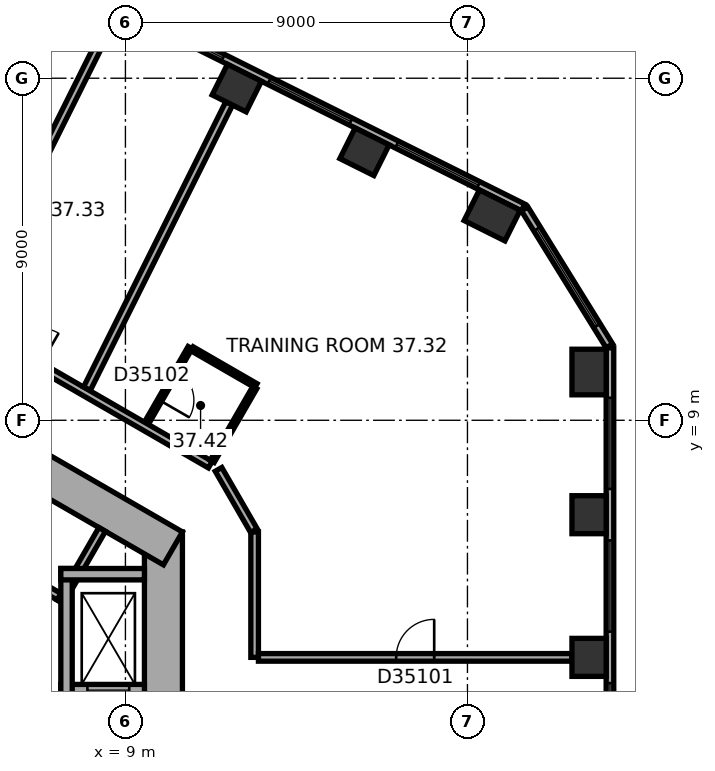
"""IFC4 building model, lengths in metres.
Left out: names, types, materials, properties, quantities, classifications, styles, units other than length and angle.
Written with IfcOpenShell. Run it as: python <this file> out.ifc"""

import sys

from ifc_helpers import new_model, si_unit, direction, frame, frame_2d, origin, origin_2d, place, context, subcontext, project, spatial, rectangle, extrude, element, fill, save


model = new_model("IFC4")
c1 = context("Model", 3, precision=1e-05, world=origin(), true_north=direction((0.0, 1.0)))
c2 = subcontext(c1, "Body", "Model", "MODEL_VIEW")
j1 = project(units=[si_unit("LENGTHUNIT", "METRE"), si_unit("PLANEANGLEUNIT", "RADIAN")], contexts=[c1])
p1 = place(None, origin())
s1 = spatial("IfcSite", under=j1, at=p1, CompositionType="ELEMENT")
p2 = place(p1, origin())
s2 = spatial("IfcBuilding", under=s1, at=p2, CompositionType="ELEMENT")
p3 = place(p2, frame((0.0, 0.0, 154.0)))
s3 = spatial("IfcBuildingStorey", under=s2, at=p3, CompositionType="ELEMENT", Elevation=154.0)
for number, where, z_axis, x_axis in (
    (1, (21.2, 2.761, 0.0), (0.0, 0.0, 1.0), (0.0, 1.0, 0.0)),
    (2, (21.2, 6.515, 0.0), (0.0, 0.0, 1.0), (0.0, 1.0, 0.0)),
):
    element("IfcColumn", number, at=place(p3, frame(where, z_axis=z_axis, x_axis=x_axis)), inside=s3, PredefinedType="COLUMN", context=c2, shape_type="SweptSolid", body=[
        extrude(rectangle(XDim=1.0, YDim=0.9, at=origin_2d()), origin(), (0.0, 0.0, 1.0), 3.7),
    ])
for number, where, z_axis, x_axis in (
    (3, (21.2, 10.27, 0.0), (0.0, 0.0, 1.0), (0.0, 1.0, 0.0)),
    (4, (18.65, 14.39, 0.0), (0.0, 0.0, 1.0), (-0.895, 0.446, 0.0)),
):
    element("IfcColumn", number, at=place(p3, frame(where, z_axis=z_axis, x_axis=x_axis)), inside=s3, PredefinedType="COLUMN", context=c2, shape_type="SweptSolid", body=[
        extrude(rectangle(XDim=1.2, YDim=0.9, at=origin_2d()), origin(), (0.0, 0.0, 1.0), 3.7),
    ])
for number, where, z_axis, x_axis in (
    (5, (15.29, 16.065, 0.0), (0.0, 0.0, 1.0), (-0.895, 0.446, 0.0)),
    (6, (11.931, 17.74, 0.0), (0.0, 0.0, 1.0), (-0.895, 0.446, 0.0)),
):
    element("IfcColumn", number, at=place(p3, frame(where, z_axis=z_axis, x_axis=x_axis)), inside=s3, PredefinedType="COLUMN", context=c2, shape_type="SweptSolid", body=[
        extrude(rectangle(XDim=1.0, YDim=0.9, at=origin_2d()), origin(), (0.0, 0.0, 1.0), 3.7),
    ])
p4 = place(p3, frame((10.0, -6.062, 0.0), z_axis=(0.0, 0.0, 1.0), x_axis=(0.0, 1.0, 0.0)))
e7 = element("IfcWall", 7, at=p4, inside=s3, PredefinedType="SHEAR", context=c2, shape_type="SweptSolid", body=[
    extrude(rectangle(XDim=12.125, YDim=1.0, at=frame_2d((6.062, 0.0))), origin(), (0.0, 0.0, 1.0), 3.7),
])
p5 = place(p4, frame((6.262, 0.0, 0.0)))
e8 = element("IfcOpeningElement", 8, at=p5, cuts=e7, PredefinedType="OPENING", context=c2, shape_type="SweptSolid", body=[
    extrude(rectangle(XDim=1.5, YDim=2.1, at=frame_2d((0.75, 1.05))), frame((0.0, 0.51, 0.0), z_axis=(0.0, -1.0, 0.0), x_axis=(1.0, 0.0, 0.0)), (0.0, 0.0, 1.0), 1.02),
])
p6 = place(p4, frame((3.112, 0.0, 0.0)))
e9 = element("IfcOpeningElement", 9, at=p6, cuts=e7, PredefinedType="OPENING", context=c2, shape_type="SweptSolid", body=[
    extrude(rectangle(XDim=0.9, YDim=2.1, at=frame_2d((0.45, 1.05))), frame((0.0, 0.51, 0.0), z_axis=(0.0, -1.0, 0.0), x_axis=(1.0, 0.0, 0.0)), (0.0, 0.0, 1.0), 1.02),
])
p7 = place(p3, frame((10.25, 5.629, 0.0), z_axis=(0.0, 0.0, 1.0), x_axis=(-0.866022616891, 0.50000482701, 0.0)))
e10 = element("IfcWall", 10, at=p7, inside=s3, PredefinedType="SHEAR", context=c2, shape_type="SweptSolid", body=[
    extrude(rectangle(XDim=12.125, YDim=1.0, at=frame_2d((6.062, 0.0))), origin(), (0.0, 0.0, 1.0), 3.7),
])
p8 = place(p7, frame((4.012, 0.0, 0.0)))
e11 = element("IfcOpeningElement", 11, at=p8, cuts=e10, PredefinedType="OPENING", context=c2, shape_type="SweptSolid", body=[
    extrude(rectangle(XDim=0.9, YDim=2.1, at=frame_2d((0.45, 1.05))), frame((0.0, 0.51, 0.0), z_axis=(0.0, -1.0, 0.0), x_axis=(1.0, 0.0, 0.0)), (0.0, 0.0, 1.0), 1.02),
])
p9 = place(p7, frame((7.912, 0.0, 0.0)))
e12 = element("IfcOpeningElement", 12, at=p9, cuts=e10, PredefinedType="OPENING", context=c2, shape_type="SweptSolid", body=[
    extrude(rectangle(XDim=0.9, YDim=2.1, at=frame_2d((0.45, 1.05))), frame((0.0, 0.51, 0.0), z_axis=(0.0, -1.0, 0.0), x_axis=(1.0, 0.0, 0.0)), (0.0, 0.0, 1.0), 1.02),
])
p10 = place(p3, frame((21.75, -9.138, 0.0), z_axis=(0.0, 0.0, 1.0), x_axis=(0.0, 1.0, 0.0)))
e13 = element("IfcWall", 13, at=p10, inside=s3, PredefinedType="STANDARD", context=c2, shape_type="SweptSolid", body=[
    extrude(rectangle(XDim=20.044, YDim=0.2, at=frame_2d((10.022, 0.0))), origin(), (0.0, 0.0, 1.0), 3.7),
])
p11 = place(p10, frame((1.314, 0.0, 0.9)))
e14 = element("IfcOpeningElement", 14, at=p11, cuts=e13, PredefinedType="OPENING", context=c2, shape_type="SweptSolid", body=[
    extrude(rectangle(XDim=2.4, YDim=2.0, at=frame_2d((1.2, 1.0))), frame((0.0, 0.11, 0.0), z_axis=(0.0, -1.0, 0.0), x_axis=(1.0, 0.0, 0.0)), (0.0, 0.0, 1.0), 0.22),
])
p12 = place(p10, frame((5.069, 0.0, 0.9)))
e15 = element("IfcOpeningElement", 15, at=p12, cuts=e13, PredefinedType="OPENING", context=c2, shape_type="SweptSolid", body=[
    extrude(rectangle(XDim=2.4, YDim=2.0, at=frame_2d((1.2, 1.0))), frame((0.0, 0.11, 0.0), z_axis=(0.0, -1.0, 0.0), x_axis=(1.0, 0.0, 0.0)), (0.0, 0.0, 1.0), 0.22),
])
p13 = place(p10, frame((8.823, 0.0, 0.9)))
e16 = element("IfcOpeningElement", 16, at=p13, cuts=e13, PredefinedType="OPENING", context=c2, shape_type="SweptSolid", body=[
    extrude(rectangle(XDim=2.4, YDim=2.0, at=frame_2d((1.2, 1.0))), frame((0.0, 0.11, 0.0), z_axis=(0.0, -1.0, 0.0), x_axis=(1.0, 0.0, 0.0)), (0.0, 0.0, 1.0), 0.22),
])
p14 = place(p10, frame((12.577, 0.0, 0.9)))
e17 = element("IfcOpeningElement", 17, at=p14, cuts=e13, PredefinedType="OPENING", context=c2, shape_type="SweptSolid", body=[
    extrude(rectangle(XDim=2.4, YDim=2.0, at=frame_2d((1.2, 1.0))), frame((0.0, 0.11, 0.0), z_axis=(0.0, -1.0, 0.0), x_axis=(1.0, 0.0, 0.0)), (0.0, 0.0, 1.0), 0.22),
])
p15 = place(p10, frame((16.331, 0.0, 0.9)))
e18 = element("IfcOpeningElement", 18, at=p15, cuts=e13, PredefinedType="OPENING", context=c2, shape_type="SweptSolid", body=[
    extrude(rectangle(XDim=2.4, YDim=2.0, at=frame_2d((1.2, 1.0))), frame((0.0, 0.11, 0.0), z_axis=(0.0, -1.0, 0.0), x_axis=(1.0, 0.0, 0.0)), (0.0, 0.0, 1.0), 0.22),
])
p16 = place(p3, frame((21.735, 10.958, 0.0), z_axis=(0.0, 0.0, 1.0), x_axis=(-0.526213807775, 0.850352296702, 0.0)))
e19 = element("IfcWall", 19, at=p16, inside=s3, PredefinedType="STANDARD", context=c2, shape_type="SweptSolid", body=[
    extrude(rectangle(XDim=4.238, YDim=0.2, at=frame_2d((2.119, 0.0))), origin(), (0.0, 0.0, 1.0), 3.7),
])
p17 = place(p16, frame((0.619, 0.0, 0.9)))
e20 = element("IfcOpeningElement", 20, at=p17, cuts=e19, PredefinedType="OPENING", context=c2, shape_type="SweptSolid", body=[
    extrude(rectangle(XDim=3.0, YDim=2.0, at=frame_2d((1.5, 1.0))), frame((0.0, 0.11, 0.0), z_axis=(0.0, -1.0, 0.0), x_axis=(1.0, 0.0, 0.0)), (0.0, 0.0, 1.0), 0.22),
])
p18 = place(p3, frame((19.464, 14.599, 0.0), z_axis=(0.0, 0.0, 1.0), x_axis=(-0.894935755043, 0.446195018289, 0.0)))
e21 = element("IfcWall", 21, at=p18, inside=s3, PredefinedType="STANDARD", context=c2, shape_type="SweptSolid", body=[
    extrude(rectangle(XDim=20.044, YDim=0.2, at=frame_2d((10.022, 0.0))), origin(), (0.0, 0.0, 1.0), 3.7),
])
p19 = place(p18, frame((1.313, 0.0, 0.9)))
e22 = element("IfcOpeningElement", 22, at=p19, cuts=e21, PredefinedType="OPENING", context=c2, shape_type="SweptSolid", body=[
    extrude(rectangle(XDim=2.4, YDim=2.0, at=frame_2d((1.2, 1.0))), frame((0.0, 0.11, 0.0), z_axis=(0.0, -1.0, 0.0), x_axis=(1.0, 0.0, 0.0)), (0.0, 0.0, 1.0), 0.22),
])
p20 = place(p18, frame((5.067, 0.0, 0.9)))
e23 = element("IfcOpeningElement", 23, at=p20, cuts=e21, PredefinedType="OPENING", context=c2, shape_type="SweptSolid", body=[
    extrude(rectangle(XDim=2.4, YDim=2.0, at=frame_2d((1.2, 1.0))), frame((0.0, 0.11, 0.0), z_axis=(0.0, -1.0, 0.0), x_axis=(1.0, 0.0, 0.0)), (0.0, 0.0, 1.0), 0.22),
])
p21 = place(p18, frame((8.821, 0.0, 0.9)))
e24 = element("IfcOpeningElement", 24, at=p21, cuts=e21, PredefinedType="OPENING", context=c2, shape_type="SweptSolid", body=[
    extrude(rectangle(XDim=2.4, YDim=2.0, at=frame_2d((1.2, 1.0))), frame((0.0, 0.11, 0.0), z_axis=(0.0, -1.0, 0.0), x_axis=(1.0, 0.0, 0.0)), (0.0, 0.0, 1.0), 0.22),
])
p22 = place(p18, frame((12.575, 0.0, 0.9)))
e25 = element("IfcOpeningElement", 25, at=p22, cuts=e21, PredefinedType="OPENING", context=c2, shape_type="SweptSolid", body=[
    extrude(rectangle(XDim=2.4, YDim=2.0, at=frame_2d((1.2, 1.0))), frame((0.0, 0.11, 0.0), z_axis=(0.0, -1.0, 0.0), x_axis=(1.0, 0.0, 0.0)), (0.0, 0.0, 1.0), 0.22),
])
p23 = place(p18, frame((16.329, 0.0, 0.9)))
e26 = element("IfcOpeningElement", 26, at=p23, cuts=e21, PredefinedType="OPENING", context=c2, shape_type="SweptSolid", body=[
    extrude(rectangle(XDim=2.4, YDim=2.0, at=frame_2d((1.2, 1.0))), frame((0.0, 0.11, 0.0), z_axis=(0.0, -1.0, 0.0), x_axis=(1.0, 0.0, 0.0)), (0.0, 0.0, 1.0), 0.22),
])
p24 = place(p3, frame((7.424, 4.259, 0.0), z_axis=(0.0, 0.0, 1.0), x_axis=(-0.866026010844, 0.49999894854, 0.0)))
e27 = element("IfcWall", 27, at=p24, inside=s3, PredefinedType="PARTITIONING", context=c2, shape_type="SweptSolid", body=[
    extrude(rectangle(XDim=8.0, YDim=0.2, at=frame_2d((4.0, 0.0))), origin(), (0.0, 0.0, 1.0), 3.42),
])
p25 = place(p3, frame((7.287, 4.222, 0.0), z_axis=(0.0, 0.0, 1.0), x_axis=(0.499946605688, 0.86605622881, 0.0)))
e28 = element("IfcWall", 28, at=p25, inside=s3, PredefinedType="PARTITIONING", context=c2, shape_type="SweptSolid", body=[
    extrude(rectangle(XDim=2.2, YDim=0.2, at=frame_2d((1.1, 0.0))), origin(), (0.0, 0.0, 1.0), 3.42),
])
p26 = place(p3, frame((7.3, 1.9, 0.0), z_axis=(0.0, 0.0, 1.0), x_axis=(1.0, 0.0, 0.0)))
e29 = element("IfcWall", 29, at=p26, inside=s3, PredefinedType="SHEAR", context=c2, shape_type="SweptSolid", body=[
    extrude(rectangle(XDim=2.2, YDim=0.3, at=frame_2d((1.1, 0.0))), origin(), (0.0, 0.0, 1.0), 3.42),
])
p27 = place(p26, frame((0.7, 0.0, 0.0)))
e30 = element("IfcOpeningElement", 30, at=p27, cuts=e29, PredefinedType="OPENING", context=c2, shape_type="SweptSolid", body=[
    extrude(rectangle(XDim=1.1, YDim=2.1, at=frame_2d((0.55, 1.05))), frame((0.0, 0.16, 0.0), z_axis=(0.0, -1.0, 0.0), x_axis=(1.0, 0.0, 0.0)), (0.0, 0.0, 1.0), 0.32),
])
p28 = place(p3, frame((7.45, 1.75, 0.0), z_axis=(0.0, 0.0, 1.0), x_axis=(0.0, 1.0, 0.0)))
e31 = element("IfcWall", 31, at=p28, inside=s3, PredefinedType="SHEAR", context=c2, shape_type="SweptSolid", body=[
    extrude(rectangle(XDim=3.35, YDim=0.3, at=frame_2d((1.675, 0.0))), origin(), (0.0, 0.0, 1.0), 3.42),
])
p29 = place(p3, frame((7.3, 4.95, 0.0), z_axis=(0.0, 0.0, 1.0), x_axis=(1.0, 0.0, 0.0)))
e32 = element("IfcWall", 32, at=p29, inside=s3, PredefinedType="SHEAR", context=c2, shape_type="SweptSolid", body=[
    extrude(rectangle(XDim=2.2, YDim=0.3, at=frame_2d((1.1, 0.0))), origin(), (0.0, 0.0, 1.0), 3.42),
])
p30 = place(p3, frame((8.37, 19.013, 0.0), z_axis=(0.0, 0.0, 1.0), x_axis=(-0.446183598632, -0.894941448538, 0.0)))
e33 = element("IfcWall", 33, at=p30, inside=s3, PredefinedType="PARTITIONING", context=c2, shape_type="SweptSolid", body=[
    extrude(rectangle(XDim=8.156, YDim=0.2, at=frame_2d((4.078, 0.0))), origin(), (0.0, 0.0, 1.0), 3.42),
])
p31 = place(p3, frame((9.552, 8.919, 0.0), z_axis=(0.0, 0.0, 1.0), x_axis=(0.499952165731, 0.866053019151, 0.0)))
e34 = element("IfcWall", 34, at=p31, inside=s3, PredefinedType="PARTITIONING", context=c2, shape_type="SweptSolid", body=[
    extrude(rectangle(XDim=2.3, YDim=0.12, at=frame_2d((1.15, 0.0))), origin(), (0.0, 0.0, 1.0), 3.42),
])
p32 = place(p31, frame((0.7, 0.0, 0.0)))
e35 = element("IfcOpeningElement", 35, at=p32, cuts=e34, PredefinedType="OPENING", context=c2, shape_type="SweptSolid", body=[
    extrude(rectangle(XDim=0.9, YDim=2.1, at=frame_2d((0.45, 1.05))), frame((0.0, 0.07, 0.0), z_axis=(0.0, -1.0, 0.0), x_axis=(1.0, 0.0, 0.0)), (0.0, 0.0, 1.0), 0.14),
])
p33 = place(p3, frame((10.753, 10.881, 0.0), z_axis=(0.0, 0.0, 1.0), x_axis=(0.866043088465, -0.499969367985, 0.0)))
e36 = element("IfcWall", 36, at=p33, inside=s3, PredefinedType="PARTITIONING", context=c2, shape_type="SweptSolid", body=[
    extrude(rectangle(XDim=1.94, YDim=0.12, at=frame_2d((0.97, 0.0))), origin(), (0.0, 0.0, 1.0), 3.42),
])
p34 = place(p3, frame((11.233, 7.833, 0.0), z_axis=(0.0, 0.0, 1.0), x_axis=(-0.866021713988, 0.50000639086, 0.0)))
e37 = element("IfcWall", 37, at=p34, inside=s3, PredefinedType="PARTITIONING", context=c2, shape_type="SweptSolid", body=[
    extrude(rectangle(XDim=11.834, YDim=0.2, at=frame_2d((5.917, 0.0))), origin(), (0.0, 0.0, 1.0), 3.42),
])
p35 = place(p34, frame((5.185, 0.0, 0.0)))
e38 = element("IfcOpeningElement", 38, at=p35, cuts=e37, PredefinedType="OPENING", context=c2, shape_type="SweptSolid", body=[
    extrude(rectangle(XDim=1.0, YDim=2.1, at=frame_2d((0.5, 1.05))), frame((0.0, 0.11, 0.0), z_axis=(0.0, -1.0, 0.0), x_axis=(1.0, 0.0, 0.0)), (0.0, 0.0, 1.0), 0.22),
])
p36 = place(p3, frame((11.73, 17.338, 0.0), z_axis=(0.0, 0.0, 1.0), x_axis=(-0.446165200553, -0.894950620881, 0.0)))
e39 = element("IfcWall", 39, at=p36, inside=s3, PredefinedType="PARTITIONING", context=c2, shape_type="SweptSolid", body=[
    extrude(rectangle(XDim=8.386, YDim=0.2, at=frame_2d((4.193, 0.0))), origin(), (0.0, 0.0, 1.0), 2.87),
])
p37 = place(p3, frame((12.38, 6.097, 0.0), z_axis=(0.0, 0.0, 1.0), x_axis=(-0.499964847546, 0.866045698112, 0.0)))
e40 = element("IfcWall", 40, at=p37, inside=s3, PredefinedType="PARTITIONING", context=c2, shape_type="SweptSolid", body=[
    extrude(rectangle(XDim=1.86, YDim=0.2, at=frame_2d((0.93, 0.0))), origin(), (0.0, 0.0, 1.0), 3.42),
])
p38 = place(p3, frame((12.4, 2.761, 0.0), z_axis=(0.0, 0.0, 1.0), x_axis=(0.0, 1.0, 0.0)))
e41 = element("IfcWall", 41, at=p38, inside=s3, PredefinedType="PARTITIONING", context=c2, shape_type="SweptSolid", body=[
    extrude(rectangle(XDim=3.301, YDim=0.2, at=frame_2d((1.65, 0.0))), origin(), (0.0, 0.0, 1.0), 3.42),
])
p39 = place(p3, frame((12.404, 9.859, 0.0), z_axis=(0.0, 0.0, 1.0), x_axis=(-0.500030632641, -0.866007717299, 0.0)))
e42 = element("IfcWall", 42, at=p39, inside=s3, PredefinedType="PARTITIONING", context=c2, shape_type="SweptSolid", body=[
    extrude(rectangle(XDim=2.24, YDim=0.12, at=frame_2d((1.12, 0.0))), origin(), (0.0, 0.0, 1.0), 3.42),
])
p40 = place(p3, frame((20.75, 2.761, 0.0), z_axis=(0.0, 0.0, 1.0), x_axis=(-1.0, 0.0, 0.0)))
e43 = element("IfcWall", 43, at=p40, inside=s3, PredefinedType="PARTITIONING", context=c2, shape_type="SweptSolid", body=[
    extrude(rectangle(XDim=8.25, YDim=0.2, at=frame_2d((4.125, 0.0))), origin(), (0.0, 0.0, 1.0), 3.42),
])
p41 = place(p40, frame((3.625, 0.0, 0.0)))
e44 = element("IfcOpeningElement", 44, at=p41, cuts=e43, PredefinedType="OPENING", context=c2, shape_type="SweptSolid", body=[
    extrude(rectangle(XDim=1.0, YDim=2.1, at=frame_2d((0.5, 1.05))), frame((0.0, 0.11, 0.0), z_axis=(0.0, -1.0, 0.0), x_axis=(1.0, 0.0, 0.0)), (0.0, 0.0, 1.0), 0.22),
])
p42 = place(p13, origin())
e45 = element("IfcWindow", 45, at=p42, inside=s3, PartitioningType="SINGLE_PANEL", PredefinedType="WINDOW", context=c2, shape_type="SweptSolid", body=[
    extrude(rectangle(XDim=2.4, YDim=2.0, at=frame_2d((1.2, 1.0))), frame((0.0, 0.03, 0.0), z_axis=(0.0, -1.0, 0.0), x_axis=(1.0, 0.0, 0.0)), (0.0, 0.0, 1.0), 0.06),
])
fill(e16, e45)
p43 = place(p14, origin())
e46 = element("IfcWindow", 46, at=p43, inside=s3, PartitioningType="SINGLE_PANEL", PredefinedType="WINDOW", context=c2, shape_type="SweptSolid", body=[
    extrude(rectangle(XDim=2.4, YDim=2.0, at=frame_2d((1.2, 1.0))), frame((0.0, 0.03, 0.0), z_axis=(0.0, -1.0, 0.0), x_axis=(1.0, 0.0, 0.0)), (0.0, 0.0, 1.0), 0.06),
])
fill(e17, e46)
p44 = place(p15, origin())
e47 = element("IfcWindow", 47, at=p44, inside=s3, PartitioningType="SINGLE_PANEL", PredefinedType="WINDOW", context=c2, shape_type="SweptSolid", body=[
    extrude(rectangle(XDim=2.4, YDim=2.0, at=frame_2d((1.2, 1.0))), frame((0.0, 0.03, 0.0), z_axis=(0.0, -1.0, 0.0), x_axis=(1.0, 0.0, 0.0)), (0.0, 0.0, 1.0), 0.06),
])
fill(e18, e47)
p45 = place(p17, origin())
e48 = element("IfcWindow", 48, at=p45, inside=s3, PartitioningType="SINGLE_PANEL", PredefinedType="WINDOW", context=c2, shape_type="SweptSolid", body=[
    extrude(rectangle(XDim=3.0, YDim=2.0, at=frame_2d((1.5, 1.0))), frame((0.0, 0.03, 0.0), z_axis=(0.0, -1.0, 0.0), x_axis=(1.0, 0.0, 0.0)), (0.0, 0.0, 1.0), 0.06),
])
fill(e20, e48)
p46 = place(p19, origin())
e49 = element("IfcWindow", 49, at=p46, inside=s3, PartitioningType="SINGLE_PANEL", PredefinedType="WINDOW", context=c2, shape_type="SweptSolid", body=[
    extrude(rectangle(XDim=2.4, YDim=2.0, at=frame_2d((1.2, 1.0))), frame((0.0, 0.03, 0.0), z_axis=(0.0, -1.0, 0.0), x_axis=(1.0, 0.0, 0.0)), (0.0, 0.0, 1.0), 0.06),
])
fill(e22, e49)
p47 = place(p20, origin())
e50 = element("IfcWindow", 50, at=p47, inside=s3, PartitioningType="SINGLE_PANEL", PredefinedType="WINDOW", context=c2, shape_type="SweptSolid", body=[
    extrude(rectangle(XDim=2.4, YDim=2.0, at=frame_2d((1.2, 1.0))), frame((0.0, 0.03, 0.0), z_axis=(0.0, -1.0, 0.0), x_axis=(1.0, 0.0, 0.0)), (0.0, 0.0, 1.0), 0.06),
])
fill(e23, e50)
p48 = place(p21, origin())
e51 = element("IfcWindow", 51, at=p48, inside=s3, PartitioningType="SINGLE_PANEL", PredefinedType="WINDOW", context=c2, shape_type="SweptSolid", body=[
    extrude(rectangle(XDim=2.4, YDim=2.0, at=frame_2d((1.2, 1.0))), frame((0.0, 0.03, 0.0), z_axis=(0.0, -1.0, 0.0), x_axis=(1.0, 0.0, 0.0)), (0.0, 0.0, 1.0), 0.06),
])
fill(e24, e51)
p49 = place(p27, origin())
e52 = element("IfcDoor", 52, at=p49, inside=s3, OperationType="DOUBLE_DOOR_SLIDING", PredefinedType="DOOR", context=c2, shape_type="SweptSolid", body=[
    extrude(rectangle(XDim=1.1, YDim=2.1, at=frame_2d((0.55, 1.05))), frame((0.0, 0.025, 0.0), z_axis=(0.0, -1.0, 0.0), x_axis=(1.0, 0.0, 0.0)), (0.0, 0.0, 1.0), 0.05),
])
fill(e30, e52)
p50 = place(p41, origin())
e53 = element("IfcDoor", 53, at=p50, inside=s3, OperationType="SINGLE_SWING_LEFT", PredefinedType="DOOR", context=c2, shape_type="SweptSolid", body=[
    extrude(rectangle(XDim=1.0, YDim=2.1, at=frame_2d((0.5, 1.05))), frame((0.0, 0.025, 0.0), z_axis=(0.0, -1.0, 0.0), x_axis=(1.0, 0.0, 0.0)), (0.0, 0.0, 1.0), 0.05),
])
fill(e44, e53)
p51 = place(p32, origin())
e54 = element("IfcDoor", 54, at=p51, inside=s3, OperationType="SINGLE_SWING_LEFT", PredefinedType="DOOR", context=c2, shape_type="SweptSolid", body=[
    extrude(rectangle(XDim=0.9, YDim=2.1, at=frame_2d((0.45, 1.05))), frame((0.0, 0.025, 0.0), z_axis=(0.0, -1.0, 0.0), x_axis=(1.0, 0.0, 0.0)), (0.0, 0.0, 1.0), 0.05),
])
fill(e35, e54)
save(model, sys.argv[1])
